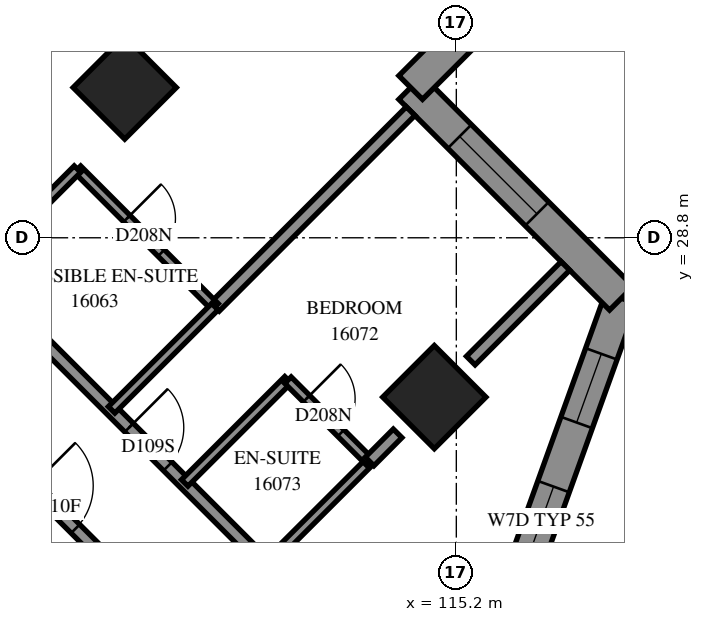
"""IFC4 building model, lengths in metres.
Left out: names, types, materials, properties, quantities, classifications, styles, units other than length and angle.
Written with IfcOpenShell. Run it as: python <this file> out.ifc"""

import sys

from ifc_helpers import new_model, si_unit, direction, frame, frame_2d, origin, origin_2d, place, context, subcontext, project, spatial, polyline, rectangle, outline, extrude, element, fill, save


model = new_model("IFC4")
c1 = context("Model", 3, precision=1e-05, world=origin(), true_north=direction((0.0, 1.0)))
c2 = subcontext(c1, "Body", "Model", "MODEL_VIEW")
j1 = project(units=[si_unit("LENGTHUNIT", "METRE"), si_unit("PLANEANGLEUNIT", "RADIAN")], contexts=[c1])
p1 = place(None, origin())
s1 = spatial("IfcSite", under=j1, at=p1, CompositionType="ELEMENT")
p2 = place(p1, origin())
s2 = spatial("IfcBuilding", under=s1, at=p2, CompositionType="ELEMENT")
p3 = place(p2, frame((0.0, 0.0, 61.0)))
s3 = spatial("IfcBuildingStorey", under=s2, at=p3, CompositionType="ELEMENT", Elevation=61.0)
for number, where, z_axis, x_axis in (
    (1, (109.747, 31.271, 0.0), (0.0, 0.0, 1.0), (0.707, -0.707, 0.0)),
    (2, (114.838, 26.18, 0.0), (0.0, 0.0, 1.0), (0.707, -0.707, 0.0)),
):
    element("IfcColumn", number, at=place(p3, frame(where, z_axis=z_axis, x_axis=x_axis)), inside=s3, PredefinedType="COLUMN", context=c2, shape_type="SweptSolid", body=[
        extrude(rectangle(XDim=1.2, YDim=1.2, at=origin_2d()), origin(), (0.0, 0.0, 1.0), 3.1),
    ])
p4 = place(p3, frame((116.106, 22.782, 0.0), z_axis=(0.0, 0.0, 1.0), x_axis=(0.3387725306, 0.9408683077, 0.0)))
e3 = element("IfcWall", 3, at=p4, inside=s3, PredefinedType="SOLIDWALL", context=c2, shape_type="SweptSolid", body=[
    extrude(outline(polyline([(-0.124, -0.275), (5.513, -0.275), (5.164, 0.275), (0.124, 0.275), (-0.124, -0.275)])), origin(), (0.0, 0.0, 1.0), 3.1),
])
p5 = place(p4, frame((0.847, 0.0, 0.5)))
e4 = element("IfcOpeningElement", 4, at=p5, cuts=e3, PredefinedType="OPENING", context=c2, shape_type="SweptSolid", body=[
    extrude(rectangle(XDim=1.2, YDim=2.45, at=frame_2d((0.6, 1.225))), frame((0.0, 0.285, 0.0), z_axis=(0.0, -1.0, 0.0), x_axis=(1.0, 0.0, 0.0)), (0.0, 0.0, 1.0), 0.57),
])
p6 = place(p4, frame((3.167, 0.0, 0.5)))
e5 = element("IfcOpeningElement", 5, at=p6, cuts=e3, PredefinedType="OPENING", context=c2, shape_type="SweptSolid", body=[
    extrude(rectangle(XDim=1.2, YDim=2.45, at=frame_2d((0.6, 1.225))), frame((0.0, 0.285, 0.0), z_axis=(0.0, -1.0, 0.0), x_axis=(1.0, 0.0, 0.0)), (0.0, 0.0, 1.0), 0.57),
])
p7 = place(p3, frame((117.914, 27.805, 0.0), z_axis=(0.0, 0.0, 1.0), x_axis=(-0.7071067812, 0.7071067812, 0.0)))
e6 = element("IfcWall", 6, at=p7, inside=s3, PredefinedType="SOLIDWALL", context=c2, shape_type="SweptSolid", body=[
    extrude(outline(polyline([(-0.174, -0.275), (4.625, -0.275), (5.175, 0.275), (0.174, 0.275), (-0.174, -0.275)])), origin(), (0.0, 0.0, 1.0), 3.1),
])
p8 = place(p7, frame((1.963, 0.0, 0.6)))
e7 = element("IfcOpeningElement", 7, at=p8, cuts=e6, PredefinedType="OPENING", context=c2, shape_type="SweptSolid", body=[
    extrude(rectangle(XDim=1.8, YDim=1.9, at=frame_2d((0.9, 0.95))), frame((0.0, 0.285, 0.0), z_axis=(0.0, -1.0, 0.0), x_axis=(1.0, 0.0, 0.0)), (0.0, 0.0, 1.0), 0.57),
])
p9 = place(p3, frame((114.449, 31.271, 0.0), z_axis=(0.0, 0.0, 1.0), x_axis=(0.7070982928, 0.7071152695, 0.0)))
e8 = element("IfcWall", 8, at=p9, inside=s3, PredefinedType="SOLIDWALL", context=c2, shape_type="SweptSolid", body=[
    extrude(outline(polyline([(0.275, -0.275), (6.278, -0.275), (5.503, 0.275), (-0.275, 0.275), (0.275, -0.275)])), origin(), (0.0, 0.0, 1.0), 3.1),
])
p10 = place(p9, frame((1.137, 0.0, 0.6)))
e9 = element("IfcOpeningElement", 9, at=p10, cuts=e8, PredefinedType="OPENING", context=c2, shape_type="SweptSolid", body=[
    extrude(rectangle(XDim=1.8, YDim=1.9, at=frame_2d((0.9, 0.95))), frame((0.0, 0.285, 0.0), z_axis=(0.0, -1.0, 0.0), x_axis=(1.0, 0.0, 0.0)), (0.0, 0.0, 1.0), 0.57),
])
p11 = place(p9, frame((3.989, 0.0, 0.6)))
e10 = element("IfcOpeningElement", 10, at=p11, cuts=e8, PredefinedType="OPENING", context=c2, shape_type="SweptSolid", body=[
    extrude(rectangle(XDim=1.2, YDim=1.9, at=frame_2d((0.6, 0.95))), frame((0.0, 0.285, 0.0), z_axis=(0.0, -1.0, 0.0), x_axis=(1.0, 0.0, 0.0)), (0.0, 0.0, 1.0), 0.57),
])
p12 = place(p3, frame((101.825, 31.125, 0.0), z_axis=(0.0, 0.0, 1.0), x_axis=(0.7071067812, -0.7071067812, 0.0)))
e11 = element("IfcWall", 11, at=p12, inside=s3, PredefinedType="PARTITIONING", context=c2, shape_type="SweptSolid", body=[
    extrude(rectangle(XDim=12.7, YDim=0.2, at=frame_2d((6.35, 0.0))), origin(), (0.0, 0.0, 1.0), 3.1),
])
p13 = place(p12, frame((3.895, 0.0, 0.0)))
e12 = element("IfcOpeningElement", 12, at=p13, cuts=e11, PredefinedType="OPENING", context=c2, shape_type="SweptSolid", body=[
    extrude(rectangle(XDim=0.9, YDim=2.1, at=frame_2d((0.45, 1.05))), frame((0.0, 0.11, 0.0), z_axis=(0.0, -1.0, 0.0), x_axis=(1.0, 0.0, 0.0)), (0.0, 0.0, 1.0), 0.22),
])
p14 = place(p12, frame((9.056, 0.0, 0.0)))
e13 = element("IfcOpeningElement", 13, at=p14, cuts=e11, PredefinedType="OPENING", context=c2, shape_type="SweptSolid", body=[
    extrude(rectangle(XDim=1.0, YDim=2.1, at=frame_2d((0.5, 1.05))), frame((0.0, 0.11, 0.0), z_axis=(0.0, -1.0, 0.0), x_axis=(1.0, 0.0, 0.0)), (0.0, 0.0, 1.0), 0.22),
])
p15 = place(p3, frame((106.987, 28.509, 0.0), z_axis=(0.0, 0.0, 1.0), x_axis=(0.7071067812, -0.7071067812, 0.0)))
e14 = element("IfcWall", 14, at=p15, inside=s3, PredefinedType="PARTITIONING", context=c2, shape_type="SweptSolid", body=[
    extrude(rectangle(XDim=7.198, YDim=0.2, at=frame_2d((3.599, 0.0))), origin(), (0.0, 0.0, 1.0), 3.1),
])
p16 = place(p15, frame((4.004, 0.0, 0.0)))
e15 = element("IfcOpeningElement", 15, at=p16, cuts=e14, PredefinedType="OPENING", context=c2, shape_type="SweptSolid", body=[
    extrude(rectangle(XDim=0.9, YDim=2.1, at=frame_2d((0.45, 1.05))), frame((0.0, 0.11, 0.0), z_axis=(0.0, -1.0, 0.0), x_axis=(1.0, 0.0, 0.0)), (0.0, 0.0, 1.0), 0.22),
])
p17 = place(p3, frame((111.231, 27.665, 0.0), z_axis=(0.0, 0.0, 1.0), x_axis=(0.7071067812, 0.7071067812, 0.0)))
e16 = element("IfcWall", 16, at=p17, inside=s3, PredefinedType="PARTITIONING", context=c2, shape_type="SweptSolid", body=[
    extrude(rectangle(XDim=4.55, YDim=0.2, at=frame_2d((2.275, 0.0))), origin(), (0.0, 0.0, 1.0), 3.1),
])
p18 = place(p3, frame((108.97, 29.928, 0.0), z_axis=(0.0, 0.0, 1.0), x_axis=(0.7067942478, -0.7074191764, 0.0)))
e17 = element("IfcWall", 17, at=p18, inside=s3, PredefinedType="PARTITIONING", context=c2, shape_type="SweptSolid", body=[
    extrude(rectangle(XDim=3.2, YDim=0.15, at=frame_2d((1.6, 0.0))), origin(), (0.0, 0.0, 1.0), 3.1),
])
p19 = place(p18, frame((1.148, 0.0, 0.0)))
e18 = element("IfcOpeningElement", 18, at=p19, cuts=e17, PredefinedType="OPENING", context=c2, shape_type="SweptSolid", body=[
    extrude(rectangle(XDim=0.8, YDim=2.1, at=frame_2d((0.4, 1.05))), frame((0.0, 0.085, 0.0), z_axis=(0.0, -1.0, 0.0), x_axis=(1.0, 0.0, 0.0)), (0.0, 0.0, 1.0), 0.17),
])
p20 = place(p3, frame((107.271, 28.231, 0.0), z_axis=(0.0, 0.0, 1.0), x_axis=(0.7071067812, 0.7071067812, 0.0)))
e19 = element("IfcWall", 19, at=p20, inside=s3, PredefinedType="PARTITIONING", context=c2, shape_type="SweptSolid", body=[
    extrude(rectangle(XDim=2.401, YDim=0.15, at=frame_2d((1.201, 0.0))), origin(), (0.0, 0.0, 1.0), 3.1),
])
p21 = place(p3, frame((112.077, 23.425, 0.0), z_axis=(0.0, 0.0, 1.0), x_axis=(0.7075233388, 0.706689978, 0.0)))
e20 = element("IfcWall", 20, at=p21, inside=s3, PredefinedType="PARTITIONING", context=c2, shape_type="SweptSolid", body=[
    extrude(rectangle(XDim=2.4, YDim=0.15, at=frame_2d((1.2, 0.0))), origin(), (0.0, 0.0, 1.0), 2.6),
])
for number, where, z_axis, x_axis in (
    (21, (109.531, 25.971, 0.0), (0.0, 0.0, 1.0), (0.708, 0.707, 0.0)),
    (22, (110.734, 24.768, 0.0), (0.0, 0.0, 1.0), (0.708, 0.707, 0.0)),
):
    element("IfcWall", number, at=place(p3, frame(where, z_axis=z_axis, x_axis=x_axis)), inside=s3, PredefinedType="PARTITIONING", context=c2, shape_type="SweptSolid", body=[
        extrude(rectangle(XDim=2.4, YDim=0.15, at=frame_2d((1.2, 0.0))), origin(), (0.0, 0.0, 1.0), 3.1),
    ])
p22 = place(p3, frame((115.438, 26.78, 0.0), z_axis=(0.0, 0.0, 1.0), x_axis=(0.7071067812, 0.7071067812, 0.0)))
e23 = element("IfcWall", 23, at=p22, inside=s3, PredefinedType="PARTITIONING", context=c2, shape_type="SweptSolid", body=[
    extrude(rectangle(XDim=2.201, YDim=0.2, at=frame_2d((1.101, 0.0))), origin(), (0.0, 0.0, 1.0), 3.1),
])
p23 = place(p3, frame((112.431, 26.459, 0.0), z_axis=(0.0, 0.0, 1.0), x_axis=(0.7071067812, -0.7071067812, 0.0)))
e24 = element("IfcWall", 24, at=p23, inside=s3, PredefinedType="PARTITIONING", context=c2, shape_type="SweptSolid", body=[
    extrude(rectangle(XDim=1.901, YDim=0.15, at=frame_2d((0.95, 0.0))), origin(), (0.0, 0.0, 1.0), 3.1),
])
p24 = place(p23, frame((0.431, 0.0, 0.0)))
e25 = element("IfcOpeningElement", 25, at=p24, cuts=e24, PredefinedType="OPENING", context=c2, shape_type="SweptSolid", body=[
    extrude(rectangle(XDim=0.8, YDim=2.1, at=frame_2d((0.4, 1.05))), frame((0.0, 0.085, 0.0), z_axis=(0.0, -1.0, 0.0), x_axis=(1.0, 0.0, 0.0)), (0.0, 0.0, 1.0), 0.17),
])
p25 = place(p3, frame((113.775, 25.122, 0.0), z_axis=(0.0, 0.0, 1.0), x_axis=(0.705571267, 0.7086389682, 0.0)))
e26 = element("IfcWall", 26, at=p25, inside=s3, PredefinedType="PARTITIONING", context=c2, shape_type="SweptSolid", body=[
    extrude(rectangle(XDim=0.652, YDim=0.2, at=frame_2d((0.326, 0.0))), origin(), (0.0, 0.0, 1.0), 2.6),
])
p26 = place(p5, origin())
e27 = element("IfcWindow", 27, at=p26, inside=s3, PartitioningType="SINGLE_PANEL", PredefinedType="WINDOW", context=c2, shape_type="SweptSolid", body=[
    extrude(rectangle(XDim=1.2, YDim=2.45, at=frame_2d((0.6, 1.225))), frame((0.0, 0.155, 0.0), z_axis=(0.0, -1.0, 0.0), x_axis=(1.0, 0.0, 0.0)), (0.0, 0.0, 1.0), 0.06),
])
fill(e4, e27)
p27 = place(p6, origin())
e28 = element("IfcWindow", 28, at=p27, inside=s3, PartitioningType="SINGLE_PANEL", PredefinedType="WINDOW", context=c2, shape_type="SweptSolid", body=[
    extrude(rectangle(XDim=1.2, YDim=2.45, at=frame_2d((0.6, 1.225))), frame((0.0, 0.155, 0.0), z_axis=(0.0, -1.0, 0.0), x_axis=(1.0, 0.0, 0.0)), (0.0, 0.0, 1.0), 0.06),
])
fill(e5, e28)
p28 = place(p8, origin())
e29 = element("IfcWindow", 29, at=p28, inside=s3, PartitioningType="SINGLE_PANEL", PredefinedType="WINDOW", context=c2, shape_type="SweptSolid", body=[
    extrude(rectangle(XDim=1.8, YDim=1.9, at=frame_2d((0.9, 0.95))), frame((0.0, 0.155, 0.0), z_axis=(0.0, -1.0, 0.0), x_axis=(1.0, 0.0, 0.0)), (0.0, 0.0, 1.0), 0.06),
])
fill(e7, e29)
p29 = place(p19, origin())
e30 = element("IfcDoor", 30, at=p29, inside=s3, OperationType="SINGLE_SWING_RIGHT", PredefinedType="DOOR", context=c2, shape_type="SweptSolid", body=[
    extrude(rectangle(XDim=0.8, YDim=2.1, at=frame_2d((0.4, 1.05))), frame((0.0, 0.025, 0.0), z_axis=(0.0, -1.0, 0.0), x_axis=(1.0, 0.0, 0.0)), (0.0, 0.0, 1.0), 0.05),
])
fill(e18, e30)
p30 = place(p14, origin())
e31 = element("IfcDoor", 31, at=p30, inside=s3, OperationType="SINGLE_SWING_RIGHT", PredefinedType="DOOR", context=c2, shape_type="SweptSolid", body=[
    extrude(rectangle(XDim=1.0, YDim=2.1, at=frame_2d((0.5, 1.05))), frame((0.0, 0.025, 0.0), z_axis=(0.0, -1.0, 0.0), x_axis=(1.0, 0.0, 0.0)), (0.0, 0.0, 1.0), 0.05),
])
fill(e13, e31)
p31 = place(p16, origin())
e32 = element("IfcDoor", 32, at=p31, inside=s3, OperationType="SINGLE_SWING_RIGHT", PredefinedType="DOOR", context=c2, shape_type="SweptSolid", body=[
    extrude(rectangle(XDim=0.9, YDim=2.1, at=frame_2d((0.45, 1.05))), frame((0.0, 0.025, 0.0), z_axis=(0.0, -1.0, 0.0), x_axis=(1.0, 0.0, 0.0)), (0.0, 0.0, 1.0), 0.05),
])
fill(e15, e32)
p32 = place(p24, origin())
e33 = element("IfcDoor", 33, at=p32, inside=s3, OperationType="SINGLE_SWING_RIGHT", PredefinedType="DOOR", context=c2, shape_type="SweptSolid", body=[
    extrude(rectangle(XDim=0.8, YDim=2.1, at=frame_2d((0.4, 1.05))), frame((0.0, 0.025, 0.0), z_axis=(0.0, -1.0, 0.0), x_axis=(1.0, 0.0, 0.0)), (0.0, 0.0, 1.0), 0.05),
])
fill(e25, e33)
save(model, sys.argv[1])
